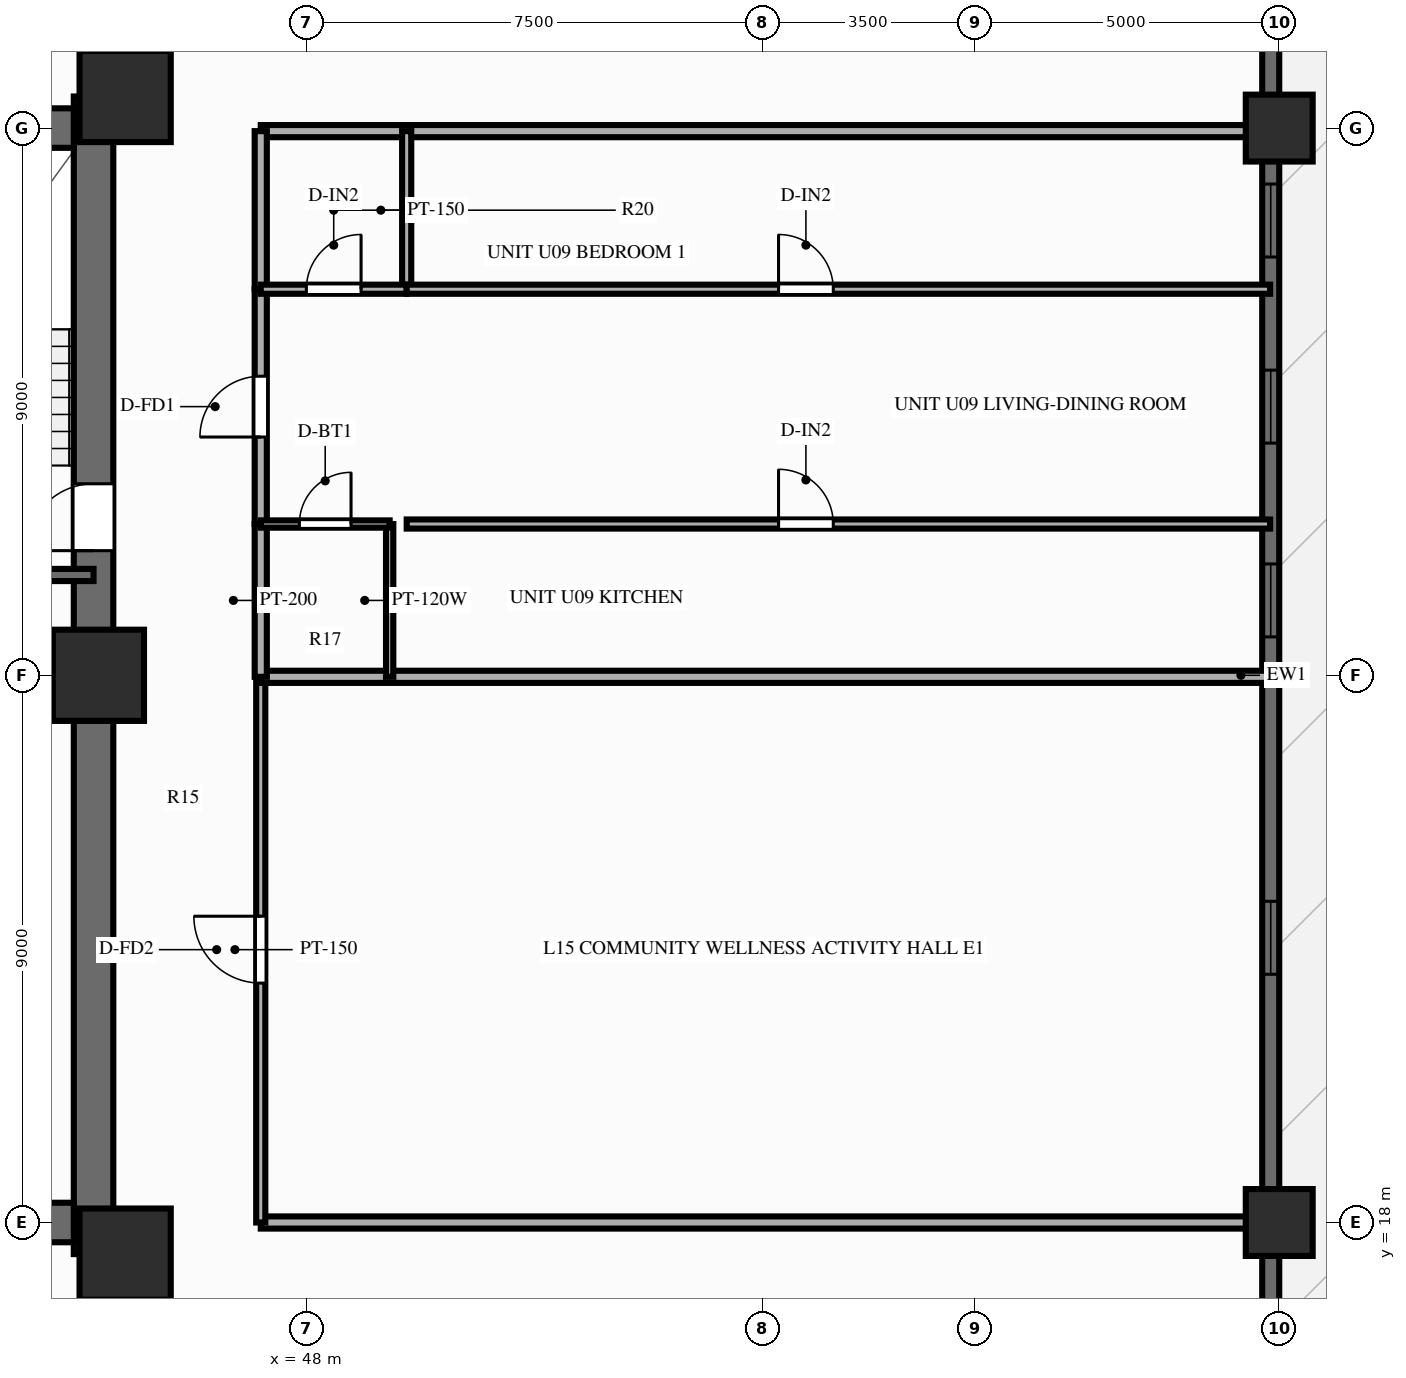
"""IFC4 building model, lengths in metres.
Left out: names, types, materials, properties, quantities, classifications, styles, units other than length and angle.
Written with IfcOpenShell. Run it as: python <this file> out.ifc"""

import sys

from ifc_helpers import new_model, si_unit, direction, frame, frame_2d, origin, origin_2d, place, context, subcontext, project, spatial, rectangle, extrude, source, transform, mapped, element, fill, save


model = new_model("IFC4")
c1 = context("Model", 3, precision=1e-05, world=origin(), true_north=direction((0.0, 1.0)))
c2 = subcontext(c1, "Body", "Model", "MODEL_VIEW")
j1 = project(units=[si_unit("LENGTHUNIT", "METRE"), si_unit("PLANEANGLEUNIT", "RADIAN")], contexts=[c1])
p1 = place(None, origin())
s1 = spatial("IfcSite", under=j1, at=p1, CompositionType="ELEMENT")
p2 = place(p1, origin())
s2 = spatial("IfcBuilding", under=s1, at=p2, CompositionType="ELEMENT")
p3 = place(p2, frame((0.0, 0.0, 49.4)))
s3 = spatial("IfcBuildingStorey", under=s2, at=p3, CompositionType="ELEMENT", Elevation=49.4)
p4 = place(p3, frame((44.5, 17.48, 0.0), z_axis=(0.0, 0.0, 1.0), x_axis=(0.0, 1.0, 0.0)))
e1 = element("IfcWall", 1, at=p4, inside=s3, PredefinedType="SHEAR", context=c2, shape_type="SweptSolid", body=[
    extrude(rectangle(XDim=19.04, YDim=0.65, at=frame_2d((9.52, 0.0))), origin(), (0.0, 0.0, 1.0), 3.0),
])
p5 = place(p4, frame((12.67, 0.0, 0.0), z_axis=(0.0, 0.0, 1.0), x_axis=(-1.0, 0.0, 0.0)))
e2 = element("IfcOpeningElement", 2, at=p5, cuts=e1, PredefinedType="OPENING", context=c2, shape_type="SweptSolid", body=[
    extrude(rectangle(XDim=1.1, YDim=2.15, at=frame_2d((0.55, 1.075))), frame((0.0, 0.337, 0.0), z_axis=(0.0, -1.0, 0.0), x_axis=(1.0, 0.0, 0.0)), (0.0, 0.0, 1.0), 0.674),
])
p6 = place(p3, frame((31.825, 18.0, 0.0), z_axis=(0.0, 0.0, 1.0), x_axis=(1.0, 0.0, 0.0)))
e3 = element("IfcWall", 3, at=p6, inside=s3, PredefinedType="SHEAR", context=c2, shape_type="SweptSolid", body=[
    extrude(rectangle(XDim=12.35, YDim=0.65, at=frame_2d((6.175, 0.0))), origin(), (0.0, 0.0, 1.0), 3.0),
])
p7 = place(p3, frame((31.825, 36.0, 0.0), z_axis=(0.0, 0.0, 1.0), x_axis=(1.0, 0.0, 0.0)))
e4 = element("IfcWall", 4, at=p7, inside=s3, PredefinedType="SHEAR", context=c2, shape_type="SweptSolid", body=[
    extrude(rectangle(XDim=12.35, YDim=0.65, at=frame_2d((6.175, 0.0))), origin(), (0.0, 0.0, 1.0), 3.0),
])
p8 = place(p7, frame((5.125, 0.0, 0.0), z_axis=(0.0, 0.0, 1.0), x_axis=(-1.0, 0.0, 0.0)))
e5 = element("IfcOpeningElement", 5, at=p8, cuts=e4, PredefinedType="OPENING", context=c2, shape_type="SweptSolid", body=[
    extrude(rectangle(XDim=1.4, YDim=2.15, at=frame_2d((0.7, 1.075))), frame((0.0, 0.337, 0.0), z_axis=(0.0, -1.0, 0.0), x_axis=(1.0, 0.0, 0.0)), (0.0, 0.0, 1.0), 0.674),
])
m1 = source(origin(), c2, "Body", "SweptSolid", [
    extrude(rectangle(XDim=1.5, YDim=1.5, at=origin_2d()), origin(), (0.0, 0.0, 1.0), 3.0),
])
for number, where, z_axis, x_axis in (
    (6, (45.02, 17.48, 0.0), (0.0, 0.0, 1.0), (1.0, 0.0, 0.0)),
    (7, (45.02, 36.52, 0.0), (0.0, 0.0, 1.0), (1.0, 0.0, 0.0)),
    (8, (44.58, 27.0, 0.0), (0.0, 0.0, 1.0), (1.0, 0.0, 0.0)),
):
    element("IfcColumn", number, at=place(p3, frame(where, z_axis=z_axis, x_axis=x_axis)), inside=s3, PredefinedType="COLUMN", context=c2, shape_type="MappedRepresentation", body=[
        mapped(m1, transform((0.0, 0.0, 0.0), scale=1.0)),
    ])
m2 = source(origin(), c2, "Body", "SweptSolid", [
    extrude(rectangle(XDim=1.1, YDim=1.1, at=origin_2d()), origin(), (0.0, 0.0, 1.0), 3.0),
])
for number, where, z_axis, x_axis in (
    (9, (64.0, 18.0, 0.0), (0.0, 0.0, 1.0), (1.0, 0.0, 0.0)),
    (10, (64.0, 36.0, 0.0), (0.0, 0.0, 1.0), (1.0, 0.0, 0.0)),
):
    element("IfcColumn", number, at=place(p3, frame(where, z_axis=z_axis, x_axis=x_axis)), inside=s3, PredefinedType="COLUMN", context=c2, shape_type="MappedRepresentation", body=[
        mapped(m2, transform((0.0, 0.0, 0.0), scale=1.0)),
    ])
p9 = place(p3, frame((63.86, 6.5, 0.0), z_axis=(0.0, 0.0, 1.0), x_axis=(0.0, 1.0, 0.0)))
e11 = element("IfcWall", 11, at=p9, inside=s3, PredefinedType="SOLIDWALL", context=c2, shape_type="SweptSolid", body=[
    extrude(rectangle(XDim=41.0, YDim=0.28, at=frame_2d((20.5, 0.0))), origin(), (0.0, 0.0, 1.0), 2.28),
])
p10 = place(p9, frame((5.15, 0.0, 0.25)))
e12 = element("IfcOpeningElement", 12, at=p10, cuts=e11, PredefinedType="OPENING", context=c2, shape_type="SweptSolid", body=[
    extrude(rectangle(XDim=1.2, YDim=1.5, at=frame_2d((0.6, 0.75))), frame((0.0, 0.152, 0.0), z_axis=(0.0, -1.0, 0.0), x_axis=(1.0, 0.0, 0.0)), (0.0, 0.0, 1.0), 0.304),
])
p11 = place(p9, frame((15.583, 0.0, 0.25)))
e13 = element("IfcOpeningElement", 13, at=p11, cuts=e11, PredefinedType="OPENING", context=c2, shape_type="SweptSolid", body=[
    extrude(rectangle(XDim=1.2, YDim=1.5, at=frame_2d((0.6, 0.75))), frame((0.0, 0.152, 0.0), z_axis=(0.0, -1.0, 0.0), x_axis=(1.0, 0.0, 0.0)), (0.0, 0.0, 1.0), 0.304),
])
p12 = place(p9, frame((21.132, 0.0, 0.25)))
e14 = element("IfcOpeningElement", 14, at=p12, cuts=e11, PredefinedType="OPENING", context=c2, shape_type="SweptSolid", body=[
    extrude(rectangle(XDim=1.2, YDim=1.5, at=frame_2d((0.6, 0.75))), frame((0.0, 0.152, 0.0), z_axis=(0.0, -1.0, 0.0), x_axis=(1.0, 0.0, 0.0)), (0.0, 0.0, 1.0), 0.304),
])
p13 = place(p9, frame((24.319, 0.0, 0.25)))
e15 = element("IfcOpeningElement", 15, at=p13, cuts=e11, PredefinedType="OPENING", context=c2, shape_type="SweptSolid", body=[
    extrude(rectangle(XDim=1.2, YDim=1.5, at=frame_2d((0.6, 0.75))), frame((0.0, 0.152, 0.0), z_axis=(0.0, -1.0, 0.0), x_axis=(1.0, 0.0, 0.0)), (0.0, 0.0, 1.0), 0.304),
])
p14 = place(p9, frame((27.38, 0.0, 0.25)))
e16 = element("IfcOpeningElement", 16, at=p14, cuts=e11, PredefinedType="OPENING", context=c2, shape_type="SweptSolid", body=[
    extrude(rectangle(XDim=1.2, YDim=1.5, at=frame_2d((0.6, 0.75))), frame((0.0, 0.152, 0.0), z_axis=(0.0, -1.0, 0.0), x_axis=(1.0, 0.0, 0.0)), (0.0, 0.0, 1.0), 0.304),
])
p15 = place(p9, frame((36.05, 0.0, 0.0), z_axis=(0.0, 0.0, 1.0), x_axis=(-1.0, 0.0, 0.0)))
e17 = element("IfcOpeningElement", 17, at=p15, cuts=e11, PredefinedType="OPENING", context=c2, shape_type="SweptSolid", body=[
    extrude(rectangle(XDim=1.6, YDim=2.15, at=frame_2d((0.8, 1.075))), frame((0.0, 0.152, 0.0), z_axis=(0.0, -1.0, 0.0), x_axis=(1.0, 0.0, 0.0)), (0.0, 0.0, 1.0), 0.304),
])
p16 = place(p3, frame((40.57, 28.65, 0.0), z_axis=(0.0, 0.0, 1.0), x_axis=(1.0, 0.0, 0.0)))
e18 = element("IfcWall", 18, at=p16, inside=s3, PredefinedType="SOLIDWALL", context=c2, shape_type="SweptSolid", body=[
    extrude(rectangle(XDim=3.93, YDim=0.2, at=frame_2d((1.965, 0.0))), origin(), (0.0, 0.0, 1.0), 2.79),
])
for number, where, z_axis, x_axis in (
    (19, (47.25, 18.0, 0.0), (0.0, 0.0, 1.0), (1.0, 0.0, 0.0)),
    (20, (47.25, 35.95, 0.0), (0.0, 0.0, 1.0), (1.0, 0.0, 0.0)),
):
    element("IfcWall", number, at=place(p3, frame(where, z_axis=z_axis, x_axis=x_axis)), inside=s3, PredefinedType="PARTITIONING", context=c2, shape_type="SweptSolid", body=[
        extrude(rectangle(XDim=16.6, YDim=0.2, at=frame_2d((8.3, 0.0))), origin(), (0.0, 0.0, 1.0), 2.24),
    ])
p17 = place(p3, frame((47.25, 18.0, 0.0), z_axis=(0.0, 0.0, 1.0), x_axis=(0.0, 1.0, 0.0)))
e21 = element("IfcWall", 21, at=p17, inside=s3, PredefinedType="PARTITIONING", context=c2, shape_type="SweptSolid", body=[
    extrude(rectangle(XDim=8.975, YDim=0.15, at=frame_2d((4.488, 0.0))), origin(), (0.0, 0.0, 1.0), 2.79),
])
p18 = place(p17, frame((3.938, 0.0, 0.0)))
e22 = element("IfcOpeningElement", 22, at=p18, cuts=e21, PredefinedType="OPENING", context=c2, shape_type="SweptSolid", body=[
    extrude(rectangle(XDim=1.1, YDim=2.15, at=frame_2d((0.55, 1.075))), frame((0.0, 0.087, 0.0), z_axis=(0.0, -1.0, 0.0), x_axis=(1.0, 0.0, 0.0)), (0.0, 0.0, 1.0), 0.174),
])
p19 = place(p3, frame((47.25, 26.975, 0.0), z_axis=(0.0, 0.0, 1.0), x_axis=(1.0, 0.0, 0.0)))
e23 = element("IfcWall", 23, at=p19, inside=s3, PredefinedType="PARTITIONING", context=c2, shape_type="SweptSolid", body=[
    extrude(rectangle(XDim=16.6, YDim=0.2, at=frame_2d((8.3, 0.0))), origin(), (0.0, 0.0, 1.0), 2.79),
])
p20 = place(p3, frame((47.25, 26.975, 0.0), z_axis=(0.0, 0.0, 1.0), x_axis=(0.0, 1.0, 0.0)))
e24 = element("IfcWall", 24, at=p20, inside=s3, PredefinedType="PARTITIONING", context=c2, shape_type="SweptSolid", body=[
    extrude(rectangle(XDim=2.513, YDim=0.2, at=frame_2d((1.256, 0.0))), origin(), (0.0, 0.0, 1.0), 2.79),
])
p21 = place(p3, frame((47.25, 29.488, 0.0), z_axis=(0.0, 0.0, 1.0), x_axis=(0.0, 1.0, 0.0)))
e25 = element("IfcWall", 25, at=p21, inside=s3, PredefinedType="PARTITIONING", context=c2, shape_type="SweptSolid", body=[
    extrude(rectangle(XDim=3.862, YDim=0.2, at=frame_2d((1.931, 0.0))), origin(), (0.0, 0.0, 1.0), 2.79),
])
p22 = place(p21, frame((1.431, 0.0, 0.0)))
e26 = element("IfcOpeningElement", 26, at=p22, cuts=e25, PredefinedType="OPENING", context=c2, shape_type="SweptSolid", body=[
    extrude(rectangle(XDim=1.0, YDim=2.15, at=frame_2d((0.5, 1.075))), frame((0.0, 0.112, 0.0), z_axis=(0.0, -1.0, 0.0), x_axis=(1.0, 0.0, 0.0)), (0.0, 0.0, 1.0), 0.224),
])
p23 = place(p3, frame((47.25, 33.35, 0.0), z_axis=(0.0, 0.0, 1.0), x_axis=(0.0, 1.0, 0.0)))
e27 = element("IfcWall", 27, at=p23, inside=s3, PredefinedType="PARTITIONING", context=c2, shape_type="SweptSolid", body=[
    extrude(rectangle(XDim=2.6, YDim=0.2, at=frame_2d((1.3, 0.0))), origin(), (0.0, 0.0, 1.0), 2.79),
])
p24 = place(p3, frame((49.37, 26.975, 0.0), z_axis=(0.0, 0.0, 1.0), x_axis=(0.0, 1.0, 0.0)))
e28 = element("IfcWall", 28, at=p24, inside=s3, PredefinedType="PARTITIONING", context=c2, shape_type="SweptSolid", body=[
    extrude(rectangle(XDim=2.513, YDim=0.12, at=frame_2d((1.256, 0.0))), origin(), (0.0, 0.0, 1.0), 2.79),
])
p25 = place(p3, frame((49.65, 33.35, 0.0), z_axis=(0.0, 0.0, 1.0), x_axis=(0.0, 1.0, 0.0)))
e29 = element("IfcWall", 29, at=p25, inside=s3, PredefinedType="PARTITIONING", context=c2, shape_type="SweptSolid", body=[
    extrude(rectangle(XDim=2.6, YDim=0.15, at=frame_2d((1.3, 0.0))), origin(), (0.0, 0.0, 1.0), 2.79),
])
p26 = place(p3, frame((47.25, 29.488, 0.0), z_axis=(0.0, 0.0, 1.0), x_axis=(1.0, 0.0, 0.0)))
e30 = element("IfcWall", 30, at=p26, inside=s3, PredefinedType="PARTITIONING", context=c2, shape_type="SweptSolid", body=[
    extrude(rectangle(XDim=2.12, YDim=0.12, at=frame_2d((1.06, 0.0))), origin(), (0.0, 0.0, 1.0), 2.79),
])
p27 = place(p26, frame((0.635, 0.0, 0.0)))
e31 = element("IfcOpeningElement", 31, at=p27, cuts=e30, PredefinedType="OPENING", context=c2, shape_type="SweptSolid", body=[
    extrude(rectangle(XDim=0.85, YDim=2.05, at=frame_2d((0.425, 1.025))), frame((0.0, 0.072, 0.0), z_axis=(0.0, -1.0, 0.0), x_axis=(1.0, 0.0, 0.0)), (0.0, 0.0, 1.0), 0.144),
])
p28 = place(p3, frame((49.65, 29.488, 0.0), z_axis=(0.0, 0.0, 1.0), x_axis=(1.0, 0.0, 0.0)))
e32 = element("IfcWall", 32, at=p28, inside=s3, PredefinedType="PARTITIONING", context=c2, shape_type="SweptSolid", body=[
    extrude(rectangle(XDim=14.2, YDim=0.15, at=frame_2d((7.1, 0.0))), origin(), (0.0, 0.0, 1.0), 2.79),
])
p29 = place(p28, frame((6.116, 0.0, 0.0)))
e33 = element("IfcOpeningElement", 33, at=p29, cuts=e32, PredefinedType="OPENING", context=c2, shape_type="SweptSolid", body=[
    extrude(rectangle(XDim=0.9, YDim=2.1, at=frame_2d((0.45, 1.05))), frame((0.0, 0.087, 0.0), z_axis=(0.0, -1.0, 0.0), x_axis=(1.0, 0.0, 0.0)), (0.0, 0.0, 1.0), 0.174),
])
p30 = place(p3, frame((47.25, 33.35, 0.0), z_axis=(0.0, 0.0, 1.0), x_axis=(1.0, 0.0, 0.0)))
e34 = element("IfcWall", 34, at=p30, inside=s3, PredefinedType="PARTITIONING", context=c2, shape_type="SweptSolid", body=[
    extrude(rectangle(XDim=2.4, YDim=0.15, at=frame_2d((1.2, 0.0))), origin(), (0.0, 0.0, 1.0), 2.79),
])
p31 = place(p30, frame((0.75, 0.0, 0.0)))
e35 = element("IfcOpeningElement", 35, at=p31, cuts=e34, PredefinedType="OPENING", context=c2, shape_type="SweptSolid", body=[
    extrude(rectangle(XDim=0.9, YDim=2.1, at=frame_2d((0.45, 1.05))), frame((0.0, 0.087, 0.0), z_axis=(0.0, -1.0, 0.0), x_axis=(1.0, 0.0, 0.0)), (0.0, 0.0, 1.0), 0.174),
])
p32 = place(p3, frame((49.65, 33.35, 0.0), z_axis=(0.0, 0.0, 1.0), x_axis=(1.0, 0.0, 0.0)))
e36 = element("IfcWall", 36, at=p32, inside=s3, PredefinedType="PARTITIONING", context=c2, shape_type="SweptSolid", body=[
    extrude(rectangle(XDim=14.2, YDim=0.15, at=frame_2d((7.1, 0.0))), origin(), (0.0, 0.0, 1.0), 2.79),
])
p33 = place(p32, frame((6.116, 0.0, 0.0)))
e37 = element("IfcOpeningElement", 37, at=p33, cuts=e36, PredefinedType="OPENING", context=c2, shape_type="SweptSolid", body=[
    extrude(rectangle(XDim=0.9, YDim=2.1, at=frame_2d((0.45, 1.05))), frame((0.0, 0.087, 0.0), z_axis=(0.0, -1.0, 0.0), x_axis=(1.0, 0.0, 0.0)), (0.0, 0.0, 1.0), 0.174),
])
m3 = source(origin(), c2, "Body", "SweptSolid", [
    extrude(rectangle(XDim=1.2, YDim=1.5, at=frame_2d((0.6, 0.75))), frame((0.0, 0.03, 0.0), z_axis=(0.0, -1.0, 0.0), x_axis=(1.0, 0.0, 0.0)), (0.0, 0.0, 1.0), 0.06),
])
p34 = place(p11, origin())
e38 = element("IfcWindow", 38, at=p34, inside=s3, PartitioningType="SINGLE_PANEL", PredefinedType="WINDOW", context=c2, shape_type="MappedRepresentation", body=[
    mapped(m3, transform((0.0, 0.0, 0.0), scale=1.0)),
])
fill(e13, e38)
p35 = place(p12, origin())
e39 = element("IfcWindow", 39, at=p35, inside=s3, PartitioningType="SINGLE_PANEL", PredefinedType="WINDOW", context=c2, shape_type="MappedRepresentation", body=[
    mapped(m3, transform((0.0, 0.0, 0.0), scale=1.0)),
])
fill(e14, e39)
p36 = place(p13, origin())
e40 = element("IfcWindow", 40, at=p36, inside=s3, PartitioningType="SINGLE_PANEL", PredefinedType="WINDOW", context=c2, shape_type="MappedRepresentation", body=[
    mapped(m3, transform((0.0, 0.0, 0.0), scale=1.0)),
])
fill(e15, e40)
p37 = place(p14, origin())
e41 = element("IfcWindow", 41, at=p37, inside=s3, PartitioningType="SINGLE_PANEL", PredefinedType="WINDOW", context=c2, shape_type="MappedRepresentation", body=[
    mapped(m3, transform((0.0, 0.0, 0.0), scale=1.0)),
])
fill(e16, e41)
m4 = source(origin(), c2, "Body", "SweptSolid", [
    extrude(rectangle(XDim=1.1, YDim=2.15, at=frame_2d((0.55, 1.075))), frame((0.0, 0.025, 0.0), z_axis=(0.0, -1.0, 0.0), x_axis=(1.0, 0.0, 0.0)), (0.0, 0.0, 1.0), 0.05),
])
p38 = place(p5, origin())
e42 = element("IfcDoor", 42, at=p38, inside=s3, OperationType="SINGLE_SWING_RIGHT", PredefinedType="DOOR", context=c2, shape_type="MappedRepresentation", body=[
    mapped(m4, transform((0.0, 0.0, 0.0), scale=1.0)),
])
fill(e2, e42)
p39 = place(p18, origin())
e43 = element("IfcDoor", 43, at=p39, inside=s3, OperationType="SINGLE_SWING_RIGHT", PredefinedType="DOOR", context=c2, shape_type="MappedRepresentation", body=[
    mapped(m4, transform((0.0, 0.0, 0.0), scale=1.0)),
])
fill(e22, e43)
m5 = source(origin(), c2, "Body", "SweptSolid", [
    extrude(rectangle(XDim=1.0, YDim=2.15, at=frame_2d((0.5, 1.075))), frame((0.0, 0.025, 0.0), z_axis=(0.0, -1.0, 0.0), x_axis=(1.0, 0.0, 0.0)), (0.0, 0.0, 1.0), 0.05),
])
p40 = place(p22, origin())
e44 = element("IfcDoor", 44, at=p40, inside=s3, OperationType="SINGLE_SWING_LEFT", PredefinedType="DOOR", context=c2, shape_type="MappedRepresentation", body=[
    mapped(m5, transform((0.0, 0.0, 0.0), scale=1.0)),
])
fill(e26, e44)
m6 = source(origin(), c2, "Body", "SweptSolid", [
    extrude(rectangle(XDim=0.85, YDim=2.05, at=frame_2d((0.425, 1.025))), frame((0.0, 0.025, 0.0), z_axis=(0.0, -1.0, 0.0), x_axis=(1.0, 0.0, 0.0)), (0.0, 0.0, 1.0), 0.05),
])
p41 = place(p27, origin())
e45 = element("IfcDoor", 45, at=p41, inside=s3, OperationType="SINGLE_SWING_RIGHT", PredefinedType="DOOR", context=c2, shape_type="MappedRepresentation", body=[
    mapped(m6, transform((0.0, 0.0, 0.0), scale=1.0)),
])
fill(e31, e45)
m7 = source(origin(), c2, "Body", "SweptSolid", [
    extrude(rectangle(XDim=0.9, YDim=2.1, at=frame_2d((0.45, 1.05))), frame((0.0, 0.025, 0.0), z_axis=(0.0, -1.0, 0.0), x_axis=(1.0, 0.0, 0.0)), (0.0, 0.0, 1.0), 0.05),
])
p42 = place(p29, origin())
e46 = element("IfcDoor", 46, at=p42, inside=s3, OperationType="SINGLE_SWING_LEFT", PredefinedType="DOOR", context=c2, shape_type="MappedRepresentation", body=[
    mapped(m7, transform((0.0, 0.0, 0.0), scale=1.0)),
])
fill(e33, e46)
p43 = place(p31, origin())
e47 = element("IfcDoor", 47, at=p43, inside=s3, OperationType="SINGLE_SWING_RIGHT", PredefinedType="DOOR", context=c2, shape_type="MappedRepresentation", body=[
    mapped(m7, transform((0.0, 0.0, 0.0), scale=1.0)),
])
fill(e35, e47)
p44 = place(p33, origin())
e48 = element("IfcDoor", 48, at=p44, inside=s3, OperationType="SINGLE_SWING_LEFT", PredefinedType="DOOR", context=c2, shape_type="MappedRepresentation", body=[
    mapped(m7, transform((0.0, 0.0, 0.0), scale=1.0)),
])
fill(e37, e48)
save(model, sys.argv[1])
